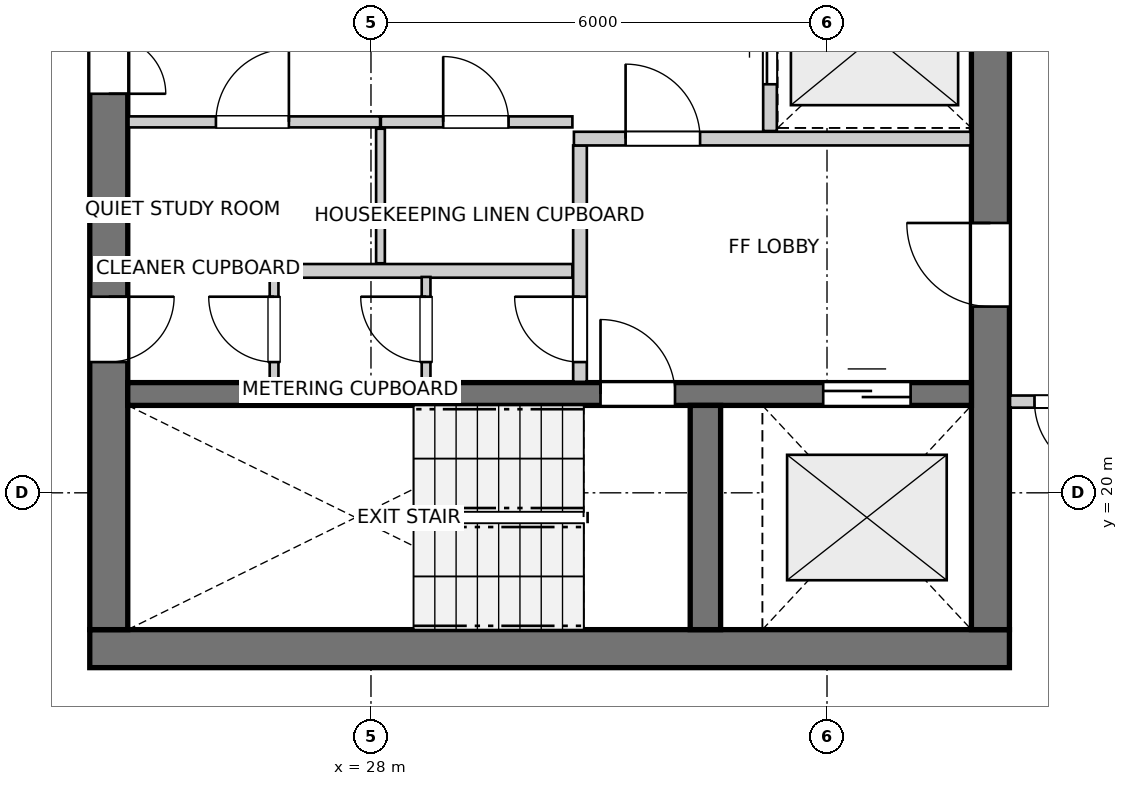
"""IFC4 building model, lengths in metres.
Left out: names, types, materials, properties, quantities, classifications, styles, units other than length and angle.
Written with IfcOpenShell. Run it as: python <this file> out.ifc"""

import sys

from ifc_helpers import new_model, si_unit, direction, frame, frame_2d, origin, place, context, subcontext, project, spatial, rectangle, extrude, source, transform, mapped, element, fill, save


model = new_model("IFC4")
c1 = context("Model", 3, precision=1e-05, world=origin(), true_north=direction((0.0, 1.0)))
c2 = subcontext(c1, "Body", "Model", "MODEL_VIEW")
j1 = project(units=[si_unit("LENGTHUNIT", "METRE"), si_unit("PLANEANGLEUNIT", "RADIAN")], contexts=[c1])
p1 = place(None, origin())
s1 = spatial("IfcSite", under=j1, at=p1, CompositionType="ELEMENT")
p2 = place(p1, origin())
s2 = spatial("IfcBuilding", under=s1, at=p2, CompositionType="ELEMENT")
p3 = place(p2, frame((0.0, 0.0, 243.6)))
s3 = spatial("IfcBuildingStorey", under=s2, at=p3, CompositionType="ELEMENT", Elevation=243.6)
p4 = place(p3, frame((24.3, 17.95, 0.0), z_axis=(0.0, 0.0, 1.0), x_axis=(1.0, 0.0, 0.0)))
e1 = element("IfcWall", 1, at=p4, inside=s3, PredefinedType="SHEAR", context=c2, shape_type="SweptSolid", body=[
    extrude(rectangle(XDim=12.1, YDim=0.5, at=frame_2d((6.05, 0.0))), origin(), (0.0, 0.0, 1.0), 2.96),
])
p5 = place(p3, frame((24.55, 33.8, 0.0), z_axis=(0.0, 0.0, 1.0), x_axis=(0.0, -1.0, 0.0)))
e2 = element("IfcWall", 2, at=p5, inside=s3, PredefinedType="SHEAR", context=c2, shape_type="SweptSolid", body=[
    extrude(rectangle(XDim=15.6, YDim=0.5, at=frame_2d((7.8, 0.0))), origin(), (0.0, 0.0, 1.0), 2.96),
])
p6 = place(p5, frame((7.05, 0.0, 0.0)))
e3 = element("IfcOpeningElement", 3, at=p6, cuts=e2, PredefinedType="OPENING", context=c2, shape_type="SweptSolid", body=[
    extrude(rectangle(XDim=1.5, YDim=2.15, at=frame_2d((0.75, 1.075))), frame((0.0, 0.26, 0.0), z_axis=(0.0, -1.0, 0.0), x_axis=(1.0, 0.0, 0.0)), (0.0, 0.0, 1.0), 0.52),
])
p7 = place(p5, frame((3.52, 0.0, 0.0)))
e4 = element("IfcOpeningElement", 4, at=p7, cuts=e2, PredefinedType="OPENING", context=c2, shape_type="SweptSolid", body=[
    extrude(rectangle(XDim=0.86, YDim=2.05, at=frame_2d((0.43, 1.025))), frame((0.0, 0.26, 0.0), z_axis=(0.0, -1.0, 0.0), x_axis=(1.0, 0.0, 0.0)), (0.0, 0.0, 1.0), 0.52),
])
p8 = place(p5, frame((11.22, 0.0, 0.0)))
e5 = element("IfcOpeningElement", 5, at=p8, cuts=e2, PredefinedType="OPENING", context=c2, shape_type="SweptSolid", body=[
    extrude(rectangle(XDim=0.86, YDim=2.05, at=frame_2d((0.43, 1.025))), frame((0.0, 0.26, 0.0), z_axis=(0.0, -1.0, 0.0), x_axis=(1.0, 0.0, 0.0)), (0.0, 0.0, 1.0), 0.52),
])
p9 = place(p3, frame((36.15, 18.2, 0.0), z_axis=(0.0, 0.0, 1.0), x_axis=(0.0, 1.0, 0.0)))
e6 = element("IfcWall", 6, at=p9, inside=s3, PredefinedType="SHEAR", context=c2, shape_type="SweptSolid", body=[
    extrude(rectangle(XDim=15.6, YDim=0.5, at=frame_2d((7.8, 0.0))), origin(), (0.0, 0.0, 1.0), 2.96),
])
p10 = place(p9, frame((4.25, 0.0, 0.0)))
e7 = element("IfcOpeningElement", 7, at=p10, cuts=e6, PredefinedType="OPENING", context=c2, shape_type="SweptSolid", body=[
    extrude(rectangle(XDim=1.1, YDim=2.15, at=frame_2d((0.55, 1.075))), frame((0.0, 0.26, 0.0), z_axis=(0.0, -1.0, 0.0), x_axis=(1.0, 0.0, 0.0)), (0.0, 0.0, 1.0), 0.52),
])
p11 = place(p9, frame((10.25, 0.0, 0.0)))
e8 = element("IfcOpeningElement", 8, at=p11, cuts=e6, PredefinedType="OPENING", context=c2, shape_type="SweptSolid", body=[
    extrude(rectangle(XDim=1.1, YDim=2.15, at=frame_2d((0.55, 1.075))), frame((0.0, 0.26, 0.0), z_axis=(0.0, -1.0, 0.0), x_axis=(1.0, 0.0, 0.0)), (0.0, 0.0, 1.0), 0.52),
])
p12 = place(p3, frame((24.8, 21.3, 0.0), z_axis=(0.0, 0.0, 1.0), x_axis=(1.0, 0.0, 0.0)))
e9 = element("IfcWall", 9, at=p12, inside=s3, PredefinedType="SHEAR", context=c2, shape_type="SweptSolid", body=[
    extrude(rectangle(XDim=11.1, YDim=0.3, at=frame_2d((5.55, 0.0))), origin(), (0.0, 0.0, 1.0), 2.96),
])
p13 = place(p12, frame((6.22, 0.0, 0.0)))
e10 = element("IfcOpeningElement", 10, at=p13, cuts=e9, PredefinedType="OPENING", context=c2, shape_type="SweptSolid", body=[
    extrude(rectangle(XDim=0.98, YDim=2.15, at=frame_2d((0.49, 1.075))), frame((0.0, 0.16, 0.0), z_axis=(0.0, -1.0, 0.0), x_axis=(1.0, 0.0, 0.0)), (0.0, 0.0, 1.0), 0.32),
])
p14 = place(p12, frame((9.15, 0.0, 0.0)))
e11 = element("IfcOpeningElement", 11, at=p14, cuts=e9, PredefinedType="OPENING", context=c2, shape_type="SweptSolid", body=[
    extrude(rectangle(XDim=1.15, YDim=2.15, at=frame_2d((0.575, 1.075))), frame((0.0, 0.16, 0.0), z_axis=(0.0, -1.0, 0.0), x_axis=(1.0, 0.0, 0.0)), (0.0, 0.0, 1.0), 0.32),
])
p15 = place(p3, frame((32.4, 18.2, 0.0), z_axis=(0.0, 0.0, 1.0), x_axis=(0.0, 1.0, 0.0)))
e12 = element("IfcWall", 12, at=p15, inside=s3, PredefinedType="SHEAR", context=c2, shape_type="SweptSolid", body=[
    extrude(rectangle(XDim=2.95, YDim=0.4, at=frame_2d((1.475, 0.0))), origin(), (0.0, 0.0, 1.0), 2.96),
])
p16 = place(p3, frame((30.75, 21.46, 0.0), z_axis=(0.0, 0.0, 1.0), x_axis=(0.0, 1.0, 0.0)))
e13 = element("IfcWall", 13, at=p16, inside=s3, PredefinedType="PARTITIONING", context=c2, shape_type="SweptSolid", body=[
    extrude(rectangle(XDim=3.11, YDim=0.18, at=frame_2d((1.555, 0.0))), origin(), (0.0, 0.0, 1.0), 2.96),
])
p17 = place(p16, frame((0.26, 0.0, 0.0)))
e14 = element("IfcOpeningElement", 14, at=p17, cuts=e13, PredefinedType="OPENING", context=c2, shape_type="SweptSolid", body=[
    extrude(rectangle(XDim=0.86, YDim=2.05, at=frame_2d((0.43, 1.025))), frame((0.0, 0.1, 0.0), z_axis=(0.0, -1.0, 0.0), x_axis=(1.0, 0.0, 0.0)), (0.0, 0.0, 1.0), 0.2),
])
p18 = place(p3, frame((30.67, 24.66, 0.0), z_axis=(0.0, 0.0, 1.0), x_axis=(1.0, 0.0, 0.0)))
e15 = element("IfcWall", 15, at=p18, inside=s3, PredefinedType="PARTITIONING", context=c2, shape_type="SweptSolid", body=[
    extrude(rectangle(XDim=5.22, YDim=0.18, at=frame_2d((2.61, 0.0))), origin(), (0.0, 0.0, 1.0), 2.96),
])
p19 = place(p18, frame((0.68, 0.0, 0.0)))
e16 = element("IfcOpeningElement", 16, at=p19, cuts=e15, PredefinedType="OPENING", context=c2, shape_type="SweptSolid", body=[
    extrude(rectangle(XDim=0.98, YDim=2.15, at=frame_2d((0.49, 1.075))), frame((0.0, 0.1, 0.0), z_axis=(0.0, -1.0, 0.0), x_axis=(1.0, 0.0, 0.0)), (0.0, 0.0, 1.0), 0.2),
])
p20 = place(p3, frame((33.25, 24.76, 0.0), z_axis=(0.0, 0.0, 1.0), x_axis=(0.0, 1.0, 0.0)))
e17 = element("IfcWall", 17, at=p20, inside=s3, PredefinedType="PARTITIONING", context=c2, shape_type="SweptSolid", body=[
    extrude(rectangle(XDim=2.48, YDim=0.18, at=frame_2d((1.24, 0.0))), origin(), (0.0, 0.0, 1.0), 2.96),
])
p21 = place(p20, frame((0.615, 0.0, 0.0)))
e18 = element("IfcOpeningElement", 18, at=p21, cuts=e17, PredefinedType="OPENING", context=c2, shape_type="SweptSolid", body=[
    extrude(rectangle(XDim=1.25, YDim=2.15, at=frame_2d((0.625, 1.075))), frame((0.0, 0.1, 0.0), z_axis=(0.0, -1.0, 0.0), x_axis=(1.0, 0.0, 0.0)), (0.0, 0.0, 1.0), 0.2),
])
p22 = place(p3, frame((24.81, 22.92, 0.0), z_axis=(0.0, 0.0, 1.0), x_axis=(1.0, 0.0, 0.0)))
e19 = element("IfcWall", 19, at=p22, inside=s3, PredefinedType="PARTITIONING", context=c2, shape_type="SweptSolid", body=[
    extrude(rectangle(XDim=5.84, YDim=0.18, at=frame_2d((2.92, 0.0))), origin(), (0.0, 0.0, 1.0), 2.96),
])
p23 = place(p3, frame((24.81, 24.88, 0.0), z_axis=(0.0, 0.0, 1.0), x_axis=(1.0, 0.0, 0.0)))
e20 = element("IfcWall", 20, at=p23, inside=s3, PredefinedType="PARTITIONING", context=c2, shape_type="SweptSolid", body=[
    extrude(rectangle(XDim=3.31, YDim=0.145, at=frame_2d((1.655, 0.0))), origin(), (0.0, 0.0, 1.0), 2.96),
])
p24 = place(p23, frame((1.15, 0.0, 0.0)))
e21 = element("IfcOpeningElement", 21, at=p24, cuts=e20, PredefinedType="OPENING", context=c2, shape_type="SweptSolid", body=[
    extrude(rectangle(XDim=0.96, YDim=2.1, at=frame_2d((0.48, 1.05))), frame((0.0, 0.083, 0.0), z_axis=(0.0, -1.0, 0.0), x_axis=(1.0, 0.0, 0.0)), (0.0, 0.0, 1.0), 0.165),
])
p25 = place(p3, frame((28.13, 24.88, 0.0), z_axis=(0.0, 0.0, 1.0), x_axis=(1.0, 0.0, 0.0)))
e22 = element("IfcWall", 22, at=p25, inside=s3, PredefinedType="PARTITIONING", context=c2, shape_type="SweptSolid", body=[
    extrude(rectangle(XDim=2.52, YDim=0.145, at=frame_2d((1.26, 0.0))), origin(), (0.0, 0.0, 1.0), 2.96),
])
p26 = place(p25, frame((0.82, 0.0, 0.0)))
e23 = element("IfcOpeningElement", 23, at=p26, cuts=e22, PredefinedType="OPENING", context=c2, shape_type="SweptSolid", body=[
    extrude(rectangle(XDim=0.86, YDim=2.05, at=frame_2d((0.43, 1.025))), frame((0.0, 0.083, 0.0), z_axis=(0.0, -1.0, 0.0), x_axis=(1.0, 0.0, 0.0)), (0.0, 0.0, 1.0), 0.165),
])
p27 = place(p3, frame((28.125, 23.02, 0.0), z_axis=(0.0, 0.0, 1.0), x_axis=(0.0, 1.0, 0.0)))
e24 = element("IfcWall", 24, at=p27, inside=s3, PredefinedType="PARTITIONING", context=c2, shape_type="SweptSolid", body=[
    extrude(rectangle(XDim=1.77, YDim=0.115, at=frame_2d((0.885, 0.0))), origin(), (0.0, 0.0, 1.0), 2.96),
])
p28 = place(p3, frame((26.725, 21.46, 0.0), z_axis=(0.0, 0.0, 1.0), x_axis=(0.0, 1.0, 0.0)))
e25 = element("IfcWall", 25, at=p28, inside=s3, PredefinedType="PARTITIONING", context=c2, shape_type="SweptSolid", body=[
    extrude(rectangle(XDim=1.38, YDim=0.115, at=frame_2d((0.69, 0.0))), origin(), (0.0, 0.0, 1.0), 2.96),
])
p29 = place(p28, frame((0.26, 0.0, 0.0)))
e26 = element("IfcOpeningElement", 26, at=p29, cuts=e25, PredefinedType="OPENING", context=c2, shape_type="SweptSolid", body=[
    extrude(rectangle(XDim=0.86, YDim=2.05, at=frame_2d((0.43, 1.025))), frame((0.0, 0.067, 0.0), z_axis=(0.0, -1.0, 0.0), x_axis=(1.0, 0.0, 0.0)), (0.0, 0.0, 1.0), 0.135),
])
p30 = place(p3, frame((28.725, 21.46, 0.0), z_axis=(0.0, 0.0, 1.0), x_axis=(0.0, 1.0, 0.0)))
e27 = element("IfcWall", 27, at=p30, inside=s3, PredefinedType="PARTITIONING", context=c2, shape_type="SweptSolid", body=[
    extrude(rectangle(XDim=1.38, YDim=0.115, at=frame_2d((0.69, 0.0))), origin(), (0.0, 0.0, 1.0), 2.96),
])
p31 = place(p30, frame((0.26, 0.0, 0.0)))
e28 = element("IfcOpeningElement", 28, at=p31, cuts=e27, PredefinedType="OPENING", context=c2, shape_type="SweptSolid", body=[
    extrude(rectangle(XDim=0.86, YDim=2.05, at=frame_2d((0.43, 1.025))), frame((0.0, 0.067, 0.0), z_axis=(0.0, -1.0, 0.0), x_axis=(1.0, 0.0, 0.0)), (0.0, 0.0, 1.0), 0.135),
])
p32 = place(p3, frame((38.02, 21.2, 0.0), z_axis=(0.0, 0.0, 1.0), x_axis=(-1.0, 0.0, 0.0)))
e29 = element("IfcWall", 29, at=p32, inside=s3, PredefinedType="PARTITIONING", context=c2, shape_type="SweptSolid", body=[
    extrude(rectangle(XDim=1.612, YDim=0.16, at=frame_2d((0.806, 0.0))), origin(), (0.0, 0.0, 1.0), 2.96),
])
p33 = place(p32, frame((0.33, 0.0, 0.0)))
e30 = element("IfcOpeningElement", 30, at=p33, cuts=e29, PredefinedType="OPENING", context=c2, shape_type="SweptSolid", body=[
    extrude(rectangle(XDim=0.96, YDim=2.1, at=frame_2d((0.48, 1.05))), frame((0.0, 0.09, 0.0), z_axis=(0.0, -1.0, 0.0), x_axis=(1.0, 0.0, 0.0)), (0.0, 0.0, 1.0), 0.18),
])
m1 = source(origin(), c2, "Body", "SweptSolid", [
    extrude(rectangle(XDim=0.98, YDim=2.15, at=frame_2d((0.49, 1.075))), frame((0.0, 0.025, 0.0), z_axis=(0.0, -1.0, 0.0), x_axis=(1.0, 0.0, 0.0)), (0.0, 0.0, 1.0), 0.05),
])
p34 = place(p13, origin())
e31 = element("IfcDoor", 31, at=p34, inside=s3, OperationType="SINGLE_SWING_LEFT", PredefinedType="DOOR", context=c2, shape_type="MappedRepresentation", body=[
    mapped(m1, transform((0.0, 0.0, 0.0), x_axis=(1.0, 0.0, 0.0), y_axis=(0.0, 1.0, 0.0), z_axis=(0.0, 0.0, 1.0), scale=1.0)),
])
fill(e10, e31)
m2 = source(origin(), c2, "Body", "SweptSolid", [
    extrude(rectangle(XDim=1.15, YDim=2.15, at=frame_2d((0.575, 1.075))), frame((0.0, 0.025, 0.0), z_axis=(0.0, -1.0, 0.0), x_axis=(1.0, 0.0, 0.0)), (0.0, 0.0, 1.0), 0.05),
])
p35 = place(p14, origin())
e32 = element("IfcDoor", 32, at=p35, inside=s3, OperationType="DOUBLE_DOOR_SLIDING", PredefinedType="DOOR", context=c2, shape_type="MappedRepresentation", body=[
    mapped(m2, transform((0.0, 0.0, 0.0), x_axis=(1.0, 0.0, 0.0), y_axis=(0.0, 1.0, 0.0), z_axis=(0.0, 0.0, 1.0), scale=1.0)),
])
fill(e11, e32)
m3 = source(origin(), c2, "Body", "SweptSolid", [
    extrude(rectangle(XDim=1.1, YDim=2.15, at=frame_2d((0.55, 1.075))), frame((0.0, 0.025, 0.0), z_axis=(0.0, -1.0, 0.0), x_axis=(1.0, 0.0, 0.0)), (0.0, 0.0, 1.0), 0.05),
])
p36 = place(p10, origin())
e33 = element("IfcDoor", 33, at=p36, inside=s3, OperationType="SINGLE_SWING_RIGHT", PredefinedType="DOOR", context=c2, shape_type="MappedRepresentation", body=[
    mapped(m3, transform((0.0, 0.0, 0.0), x_axis=(1.0, 0.0, 0.0), y_axis=(0.0, 1.0, 0.0), z_axis=(0.0, 0.0, 1.0), scale=1.0)),
])
fill(e7, e33)
m4 = source(origin(), c2, "Body", "SweptSolid", [
    extrude(rectangle(XDim=1.5, YDim=2.15, at=frame_2d((0.75, 1.075))), frame((0.0, 0.025, 0.0), z_axis=(0.0, -1.0, 0.0), x_axis=(1.0, 0.0, 0.0)), (0.0, 0.0, 1.0), 0.05),
])
p37 = place(p6, origin())
e34 = element("IfcDoor", 34, at=p37, inside=s3, OperationType="DOUBLE_DOOR_SINGLE_SWING", PredefinedType="DOOR", context=c2, shape_type="MappedRepresentation", body=[
    mapped(m4, transform((0.0, 0.0, 0.0), x_axis=(1.0, 0.0, 0.0), y_axis=(0.0, 1.0, 0.0), z_axis=(0.0, 0.0, 1.0), scale=1.0)),
])
fill(e3, e34)
m5 = source(origin(), c2, "Body", "SweptSolid", [
    extrude(rectangle(XDim=0.86, YDim=2.05, at=frame_2d((0.43, 1.025))), frame((0.0, 0.025, 0.0), z_axis=(0.0, -1.0, 0.0), x_axis=(1.0, 0.0, 0.0)), (0.0, 0.0, 1.0), 0.05),
])
p38 = place(p8, origin())
e35 = element("IfcDoor", 35, at=p38, inside=s3, OperationType="SINGLE_SWING_LEFT", PredefinedType="DOOR", context=c2, shape_type="MappedRepresentation", body=[
    mapped(m5, transform((0.0, 0.0, 0.0), x_axis=(1.0, 0.0, 0.0), y_axis=(0.0, 1.0, 0.0), z_axis=(0.0, 0.0, 1.0), scale=1.0)),
])
fill(e5, e35)
p39 = place(p17, origin())
e36 = element("IfcDoor", 36, at=p39, inside=s3, OperationType="SINGLE_SWING_RIGHT", PredefinedType="DOOR", context=c2, shape_type="MappedRepresentation", body=[
    mapped(m5, transform((0.0, 0.0, 0.0), x_axis=(1.0, 0.0, 0.0), y_axis=(0.0, 1.0, 0.0), z_axis=(0.0, 0.0, 1.0), scale=1.0)),
])
fill(e14, e36)
p40 = place(p19, origin())
e37 = element("IfcDoor", 37, at=p40, inside=s3, OperationType="SINGLE_SWING_LEFT", PredefinedType="DOOR", context=c2, shape_type="MappedRepresentation", body=[
    mapped(m1, transform((0.0, 0.0, 0.0), x_axis=(1.0, 0.0, 0.0), y_axis=(0.0, 1.0, 0.0), z_axis=(0.0, 0.0, 1.0), scale=1.0)),
])
fill(e16, e37)
m6 = source(origin(), c2, "Body", "SweptSolid", [
    extrude(rectangle(XDim=1.25, YDim=2.15, at=frame_2d((0.625, 1.075))), frame((0.0, 0.025, 0.0), z_axis=(0.0, -1.0, 0.0), x_axis=(1.0, 0.0, 0.0)), (0.0, 0.0, 1.0), 0.05),
])
p41 = place(p21, origin())
e38 = element("IfcDoor", 38, at=p41, inside=s3, OperationType="DOUBLE_DOOR_SLIDING", PredefinedType="DOOR", context=c2, shape_type="MappedRepresentation", body=[
    mapped(m6, transform((0.0, 0.0, 0.0), x_axis=(1.0, 0.0, 0.0), y_axis=(0.0, 1.0, 0.0), z_axis=(0.0, 0.0, 1.0), scale=1.0)),
])
fill(e18, e38)
m7 = source(origin(), c2, "Body", "SweptSolid", [
    extrude(rectangle(XDim=0.96, YDim=2.1, at=frame_2d((0.48, 1.05))), frame((0.0, 0.025, 0.0), z_axis=(0.0, -1.0, 0.0), x_axis=(1.0, 0.0, 0.0)), (0.0, 0.0, 1.0), 0.05),
])
p42 = place(p24, origin())
e39 = element("IfcDoor", 39, at=p42, inside=s3, OperationType="SINGLE_SWING_RIGHT", PredefinedType="DOOR", context=c2, shape_type="MappedRepresentation", body=[
    mapped(m7, transform((0.0, 0.0, 0.0), x_axis=(1.0, 0.0, 0.0), y_axis=(0.0, 1.0, 0.0), z_axis=(0.0, 0.0, 1.0), scale=1.0)),
])
fill(e21, e39)
p43 = place(p26, origin())
e40 = element("IfcDoor", 40, at=p43, inside=s3, OperationType="SINGLE_SWING_LEFT", PredefinedType="DOOR", context=c2, shape_type="MappedRepresentation", body=[
    mapped(m5, transform((0.0, 0.0, 0.0), x_axis=(1.0, 0.0, 0.0), y_axis=(0.0, 1.0, 0.0), z_axis=(0.0, 0.0, 1.0), scale=1.0)),
])
fill(e23, e40)
p44 = place(p29, origin())
e41 = element("IfcDoor", 41, at=p44, inside=s3, OperationType="SINGLE_SWING_RIGHT", PredefinedType="DOOR", context=c2, shape_type="MappedRepresentation", body=[
    mapped(m5, transform((0.0, 0.0, 0.0), x_axis=(1.0, 0.0, 0.0), y_axis=(0.0, 1.0, 0.0), z_axis=(0.0, 0.0, 1.0), scale=1.0)),
])
fill(e26, e41)
p45 = place(p31, origin())
e42 = element("IfcDoor", 42, at=p45, inside=s3, OperationType="SINGLE_SWING_RIGHT", PredefinedType="DOOR", context=c2, shape_type="MappedRepresentation", body=[
    mapped(m5, transform((0.0, 0.0, 0.0), x_axis=(1.0, 0.0, 0.0), y_axis=(0.0, 1.0, 0.0), z_axis=(0.0, 0.0, 1.0), scale=1.0)),
])
fill(e28, e42)
p46 = place(p33, origin())
e43 = element("IfcDoor", 43, at=p46, inside=s3, OperationType="SINGLE_SWING_LEFT", PredefinedType="DOOR", context=c2, shape_type="MappedRepresentation", body=[
    mapped(m7, transform((0.0, 0.0, 0.0), x_axis=(1.0, 0.0, 0.0), y_axis=(0.0, 1.0, 0.0), z_axis=(0.0, 0.0, 1.0), scale=1.0)),
])
fill(e30, e43)
save(model, sys.argv[1])
